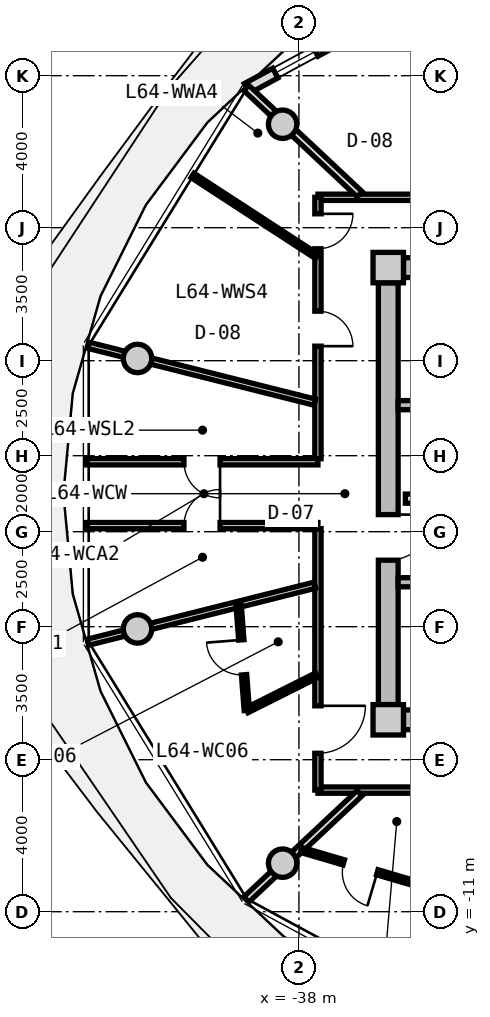
"""IFC4 building model, lengths in metres.
Left out: names, types, materials, properties, quantities, classifications, styles, units other than length and angle.
Written with IfcOpenShell. Run it as: python <this file> out.ifc"""

import sys

from ifc_helpers import new_model, si_unit, direction, frame, frame_2d, origin, origin_2d, place, context, subcontext, project, spatial, rectangle, circle, extrude, source, transform, mapped, element, fill, save


model = new_model("IFC4")
c1 = context("Model", 3, precision=1e-05, world=origin(), true_north=direction((0.0, 1.0)))
c2 = subcontext(c1, "Body", "Model", "MODEL_VIEW")
j1 = project(units=[si_unit("LENGTHUNIT", "METRE"), si_unit("PLANEANGLEUNIT", "RADIAN")], contexts=[c1])
p1 = place(None, origin())
s1 = spatial("IfcSite", under=j1, at=p1, CompositionType="ELEMENT")
p2 = place(p1, origin())
s2 = spatial("IfcBuilding", under=s1, at=p2, CompositionType="ELEMENT")
p3 = place(p2, frame((0.0, 0.0, 207.8)))
s3 = spatial("IfcBuildingStorey", under=s2, at=p3, CompositionType="ELEMENT", Elevation=207.8)
m1 = source(origin(), c2, "Body", "SweptSolid", [
    extrude(rectangle(XDim=0.8, YDim=0.8, at=origin_2d()), origin(), (0.0, 0.0, 1.0), 3.05),
])
for number, where, z_axis, x_axis in (
    (1, (-35.65, -5.95, 0.0), (0.0, 0.0, 1.0), (1.0, 0.0, 0.0)),
    (2, (-35.65, 5.95, 0.0), (0.0, 0.0, 1.0), (1.0, 0.0, 0.0)),
):
    element("IfcColumn", number, at=place(p3, frame(where, z_axis=z_axis, x_axis=x_axis)), inside=s3, PredefinedType="COLUMN", context=c2, shape_type="MappedRepresentation", body=[
        mapped(m1, transform((0.0, 0.0, 0.0), x_axis=(1.0, 0.0, 0.0), y_axis=(0.0, 1.0, 0.0), z_axis=(0.0, 0.0, 1.0), scale=1.0)),
    ])
m2 = source(origin(), c2, "Body", "SweptSolid", [
    extrude(rectangle(XDim=14.5, YDim=0.52, at=frame_2d((7.25, 0.0))), origin(), (0.0, 0.0, 1.0), 2.76),
])
for number, where, z_axis, x_axis in (
    (3, (-35.25, 5.95, 0.0), (0.0, 0.0, 1.0), (1.0, 0.0, 0.0)),
    (4, (-20.75, -5.95, 0.0), (0.0, 0.0, 1.0), (-1.0, 0.0, 0.0)),
):
    element("IfcWall", number, at=place(p3, frame(where, z_axis=z_axis, x_axis=x_axis)), inside=s3, PredefinedType="SHEAR", context=c2, shape_type="MappedRepresentation", body=[
        mapped(m2, transform((0.0, 0.0, 0.0), x_axis=(1.0, 0.0, 0.0), y_axis=(0.0, 1.0, 0.0), z_axis=(0.0, 0.0, 1.0), scale=1.0)),
    ])
m3 = source(origin(), c2, "Body", "SweptSolid", [
    extrude(rectangle(XDim=11.1, YDim=0.52, at=frame_2d((5.55, 0.0))), origin(), (0.0, 0.0, 1.0), 2.76),
])
p4 = place(p3, frame((-35.65, -5.55, 0.0), z_axis=(0.0, 0.0, 1.0), x_axis=(0.0, 1.0, 0.0)))
e5 = element("IfcWall", 5, at=p4, inside=s3, PredefinedType="SHEAR", context=c2, shape_type="MappedRepresentation", body=[
    mapped(m3, transform((0.0, 0.0, 0.0), x_axis=(1.0, 0.0, 0.0), y_axis=(0.0, 1.0, 0.0), z_axis=(0.0, 0.0, 1.0), scale=1.0)),
])
p5 = place(p4, frame((3.8, 0.0, 0.0)))
e6 = element("IfcOpeningElement", 6, at=p5, cuts=e5, PredefinedType="OPENING", context=c2, shape_type="SweptSolid", body=[
    extrude(rectangle(XDim=1.2, YDim=2.15, at=frame_2d((0.6, 1.075))), frame((0.0, 0.27, 0.0), z_axis=(0.0, -1.0, 0.0), x_axis=(1.0, 0.0, 0.0)), (0.0, 0.0, 1.0), 0.54),
])
m4 = source(origin(), c2, "Body", "SweptSolid", [
    extrude(circle(Radius=0.375, at=origin_2d()), origin(), (0.0, 0.0, 1.0), 3.05),
])
for number, where, z_axis, x_axis in (
    (7, (-38.43, 9.723, 0.0), (0.0, 0.0, 1.0), (1.0, 0.0, 0.0)),
    (8, (-42.247, 3.559, 0.0), (0.0, 0.0, 1.0), (1.0, 0.0, 0.0)),
    (9, (-42.247, -3.559, 0.0), (0.0, 0.0, 1.0), (1.0, 0.0, 0.0)),
    (10, (-38.43, -9.723, 0.0), (0.0, 0.0, 1.0), (1.0, 0.0, 0.0)),
):
    element("IfcColumn", number, at=place(p3, frame(where, z_axis=z_axis, x_axis=x_axis)), inside=s3, PredefinedType="COLUMN", context=c2, shape_type="MappedRepresentation", body=[
        mapped(m4, transform((0.0, 0.0, 0.0), x_axis=(1.0, 0.0, 0.0), y_axis=(0.0, 1.0, 0.0), z_axis=(0.0, 0.0, 1.0), scale=1.0)),
    ])
m5 = source(origin(), c2, "Body", "SweptSolid", [
    extrude(rectangle(XDim=8.197, YDim=0.29, at=frame_2d((4.099, 0.0))), origin(), (0.0, 0.0, 1.0), 2.76),
])
p6 = place(p3, frame((-39.37, 10.663, 0.0), z_axis=(0.0, 0.0, 1.0), x_axis=(0.879369910001, 0.476139224791, 0.0)))
e11 = element("IfcWall", 11, at=p6, inside=s3, PredefinedType="SOLIDWALL", context=c2, shape_type="MappedRepresentation", body=[
    mapped(m5, transform((0.0, 0.0, 0.0), x_axis=(1.0, 0.0, 0.0), y_axis=(0.0, 1.0, 0.0), z_axis=(0.0, 0.0, 1.0), scale=1.0)),
])
p7 = place(p6, frame((5.78, 0.0, 0.0)))
e12 = element("IfcOpeningElement", 12, at=p7, cuts=e11, PredefinedType="OPENING", context=c2, shape_type="SweptSolid", body=[
    extrude(rectangle(XDim=1.15, YDim=2.25, at=frame_2d((0.575, 1.125))), frame((0.0, 0.155, 0.0), z_axis=(0.0, -1.0, 0.0), x_axis=(1.0, 0.0, 0.0)), (0.0, 0.0, 1.0), 0.31),
])
p8 = place(p6, frame((0.85, 0.0, 0.85)))
e13 = element("IfcOpeningElement", 13, at=p8, cuts=e11, PredefinedType="OPENING", context=c2, shape_type="SweptSolid", body=[
    extrude(rectangle(XDim=1.2, YDim=1.5, at=frame_2d((0.6, 0.75))), frame((0.0, 0.155, 0.0), z_axis=(0.0, -1.0, 0.0), x_axis=(1.0, 0.0, 0.0)), (0.0, 0.0, 1.0), 0.31),
])
m6 = source(origin(), c2, "Body", "SweptSolid", [
    extrude(rectangle(XDim=7.93, YDim=0.24, at=frame_2d((3.965, 0.0))), origin(), (0.0, 0.0, 1.0), 2.76),
])
p9 = place(p3, frame((-35.39, 2.33, 0.0), z_axis=(0.0, 0.0, 1.0), x_axis=(1.0, 0.0, 0.0)))
e14 = element("IfcWall", 14, at=p9, inside=s3, PredefinedType="PARTITIONING", context=c2, shape_type="MappedRepresentation", body=[
    mapped(m6, transform((0.0, 0.0, 0.0), x_axis=(1.0, 0.0, 0.0), y_axis=(0.0, 1.0, 0.0), z_axis=(0.0, 0.0, 1.0), scale=1.0)),
])
p10 = place(p3, frame((-35.39, -2.33, 0.0), z_axis=(0.0, 0.0, 1.0), x_axis=(1.0, 0.0, 0.0)))
e15 = element("IfcWall", 15, at=p10, inside=s3, PredefinedType="PARTITIONING", context=c2, shape_type="MappedRepresentation", body=[
    mapped(m6, transform((0.0, 0.0, 0.0), x_axis=(1.0, 0.0, 0.0), y_axis=(0.0, 1.0, 0.0), z_axis=(0.0, 0.0, 1.0), scale=1.0)),
])
p11 = place(p10, frame((1.05, 0.0, 0.0)))
e16 = element("IfcOpeningElement", 16, at=p11, cuts=e15, PredefinedType="OPENING", context=c2, shape_type="SweptSolid", body=[
    extrude(rectangle(XDim=1.1, YDim=2.15, at=frame_2d((0.55, 1.075))), frame((0.0, 0.13, 0.0), z_axis=(0.0, -1.0, 0.0), x_axis=(1.0, 0.0, 0.0)), (0.0, 0.0, 1.0), 0.26),
])
m7 = source(origin(), c2, "Body", "SweptSolid", [
    extrude(rectangle(XDim=7.62, YDim=0.24, at=frame_2d((3.81, 0.0))), origin(), (0.0, 0.0, 1.0), 2.745),
])
p12 = place(p3, frame((-35.2, -0.13, 0.0), z_axis=(0.0, 0.0, 1.0), x_axis=(1.0, 0.0, 0.0)))
e17 = element("IfcWall", 17, at=p12, inside=s3, PredefinedType="PARTITIONING", context=c2, shape_type="MappedRepresentation", body=[
    mapped(m7, transform((0.0, 0.0, 0.0), x_axis=(1.0, 0.0, 0.0), y_axis=(0.0, 1.0, 0.0), z_axis=(0.0, 0.0, 1.0), scale=1.0)),
])
p13 = place(p12, frame((6.22, 0.0, 0.0)))
e18 = element("IfcOpeningElement", 18, at=p13, cuts=e17, PredefinedType="OPENING", context=c2, shape_type="SweptSolid", body=[
    extrude(rectangle(XDim=1.0, YDim=2.1, at=frame_2d((0.5, 1.05))), frame((0.0, 0.13, 0.0), z_axis=(0.0, -1.0, 0.0), x_axis=(1.0, 0.0, 0.0)), (0.0, 0.0, 1.0), 0.26),
])
p14 = place(p12, frame((2.4, 0.0, 0.0)))
e19 = element("IfcOpeningElement", 19, at=p14, cuts=e17, PredefinedType="OPENING", context=c2, shape_type="SweptSolid", body=[
    extrude(rectangle(XDim=1.0, YDim=2.1, at=frame_2d((0.5, 1.05))), frame((0.0, 0.13, 0.0), z_axis=(0.0, -1.0, 0.0), x_axis=(1.0, 0.0, 0.0)), (0.0, 0.0, 1.0), 0.26),
])
m8 = source(origin(), c2, "Body", "SweptSolid", [
    extrude(rectangle(XDim=8.58, YDim=0.165, at=frame_2d((4.29, 0.0))), origin(), (0.0, 0.0, 1.0), 2.745),
])
p15 = place(p3, frame((-37.5, 7.8, 0.0), z_axis=(0.0, 0.0, 1.0), x_axis=(1.0, 0.0, 0.0)))
e20 = element("IfcWall", 20, at=p15, inside=s3, PredefinedType="PARTITIONING", context=c2, shape_type="MappedRepresentation", body=[
    mapped(m8, transform((0.0, 0.0, 0.0), x_axis=(1.0, 0.0, 0.0), y_axis=(0.0, 1.0, 0.0), z_axis=(0.0, 0.0, 1.0), scale=1.0)),
])
p16 = place(p15, frame((3.528, 0.0, 0.0)))
e21 = element("IfcOpeningElement", 21, at=p16, cuts=e20, PredefinedType="OPENING", context=c2, shape_type="SweptSolid", body=[
    extrude(rectangle(XDim=1.25, YDim=2.2, at=frame_2d((0.625, 1.1))), frame((0.0, 0.093, 0.0), z_axis=(0.0, -1.0, 0.0), x_axis=(1.0, 0.0, 0.0)), (0.0, 0.0, 1.0), 0.185),
])
m9 = source(origin(), c2, "Body", "SweptSolid", [
    extrude(rectangle(XDim=19.0, YDim=0.165, at=frame_2d((9.5, 0.0))), origin(), (0.0, 0.0, 1.0), 2.745),
])
p17 = place(p3, frame((-18.5, -7.8, 0.0), z_axis=(0.0, 0.0, 1.0), x_axis=(-1.0, 0.0, 0.0)))
e22 = element("IfcWall", 22, at=p17, inside=s3, PredefinedType="PARTITIONING", context=c2, shape_type="MappedRepresentation", body=[
    mapped(m9, transform((0.0, 0.0, 0.0), x_axis=(1.0, 0.0, 0.0), y_axis=(0.0, 1.0, 0.0), z_axis=(0.0, 0.0, 1.0), scale=1.0)),
])
p18 = place(p17, frame((12.569, 0.0, 0.0)))
e23 = element("IfcOpeningElement", 23, at=p18, cuts=e22, PredefinedType="OPENING", context=c2, shape_type="SweptSolid", body=[
    extrude(rectangle(XDim=1.25, YDim=2.2, at=frame_2d((0.625, 1.1))), frame((0.0, 0.093, 0.0), z_axis=(0.0, -1.0, 0.0), x_axis=(1.0, 0.0, 0.0)), (0.0, 0.0, 1.0), 0.185),
])
p19 = place(p17, frame((8.875, 0.0, 0.0)))
e24 = element("IfcOpeningElement", 24, at=p19, cuts=e22, PredefinedType="OPENING", context=c2, shape_type="SweptSolid", body=[
    extrude(rectangle(XDim=1.25, YDim=2.2, at=frame_2d((0.625, 1.1))), frame((0.0, 0.093, 0.0), z_axis=(0.0, -1.0, 0.0), x_axis=(1.0, 0.0, 0.0)), (0.0, 0.0, 1.0), 0.185),
])
p20 = place(p17, frame((3.559, 0.0, 0.0)))
e25 = element("IfcOpeningElement", 25, at=p20, cuts=e22, PredefinedType="OPENING", context=c2, shape_type="SweptSolid", body=[
    extrude(rectangle(XDim=1.25, YDim=2.2, at=frame_2d((0.625, 1.1))), frame((0.0, 0.093, 0.0), z_axis=(0.0, -1.0, 0.0), x_axis=(1.0, 0.0, 0.0)), (0.0, 0.0, 1.0), 0.185),
])
m10 = source(origin(), c2, "Body", "SweptSolid", [
    extrude(rectangle(XDim=6.88, YDim=0.165, at=frame_2d((3.44, 0.0))), origin(), (0.0, 0.0, 1.0), 2.745),
])
p21 = place(p3, frame((-37.5, -7.8, 0.0), z_axis=(0.0, 0.0, 1.0), x_axis=(0.0, 1.0, 0.0)))
e26 = element("IfcWall", 26, at=p21, inside=s3, PredefinedType="PARTITIONING", context=c2, shape_type="MappedRepresentation", body=[
    mapped(m10, transform((0.0, 0.0, 0.0), x_axis=(1.0, 0.0, 0.0), y_axis=(0.0, 1.0, 0.0), z_axis=(0.0, 0.0, 1.0), scale=1.0)),
])
p22 = place(p21, frame((0.968, 0.0, 0.0)))
e27 = element("IfcOpeningElement", 27, at=p22, cuts=e26, PredefinedType="OPENING", context=c2, shape_type="SweptSolid", body=[
    extrude(rectangle(XDim=1.25, YDim=2.2, at=frame_2d((0.625, 1.1))), frame((0.0, 0.093, 0.0), z_axis=(0.0, -1.0, 0.0), x_axis=(1.0, 0.0, 0.0)), (0.0, 0.0, 1.0), 0.185),
])
p23 = place(p3, frame((-37.5, 0.92, 0.0), z_axis=(0.0, 0.0, 1.0), x_axis=(0.0, 1.0, 0.0)))
e28 = element("IfcWall", 28, at=p23, inside=s3, PredefinedType="PARTITIONING", context=c2, shape_type="MappedRepresentation", body=[
    mapped(m10, transform((0.0, 0.0, 0.0), x_axis=(1.0, 0.0, 0.0), y_axis=(0.0, 1.0, 0.0), z_axis=(0.0, 0.0, 1.0), scale=1.0)),
])
p24 = place(p23, frame((5.525, 0.0, 0.0)))
e29 = element("IfcOpeningElement", 29, at=p24, cuts=e28, PredefinedType="OPENING", context=c2, shape_type="SweptSolid", body=[
    extrude(rectangle(XDim=0.92, YDim=2.1, at=frame_2d((0.46, 1.05))), frame((0.0, 0.093, 0.0), z_axis=(0.0, -1.0, 0.0), x_axis=(1.0, 0.0, 0.0)), (0.0, 0.0, 1.0), 0.185),
])
p25 = place(p23, frame((2.962, 0.0, 0.0)))
e30 = element("IfcOpeningElement", 30, at=p25, cuts=e28, PredefinedType="OPENING", context=c2, shape_type="SweptSolid", body=[
    extrude(rectangle(XDim=0.92, YDim=2.1, at=frame_2d((0.46, 1.05))), frame((0.0, 0.093, 0.0), z_axis=(0.0, -1.0, 0.0), x_axis=(1.0, 0.0, 0.0)), (0.0, 0.0, 1.0), 0.185),
])
m11 = source(origin(), c2, "Body", "SweptSolid", [
    extrude(rectangle(XDim=6.157, YDim=0.165, at=frame_2d((3.079, 0.0))), origin(), (0.0, 0.0, 1.0), 2.385),
])
p26 = place(p3, frame((-37.58, 2.407, 0.0), z_axis=(0.0, 0.0, 1.0), x_axis=(-0.969840867184, 0.243738984038, 0.0)))
e31 = element("IfcWall", 31, at=p26, inside=s3, PredefinedType="PARTITIONING", context=c2, shape_type="MappedRepresentation", body=[
    mapped(m11, transform((0.0, 0.0, 0.0), x_axis=(1.0, 0.0, 0.0), y_axis=(0.0, 1.0, 0.0), z_axis=(0.0, 0.0, 1.0), scale=1.0)),
])
m12 = source(origin(), c2, "Body", "SweptSolid", [
    extrude(rectangle(XDim=6.157, YDim=0.165, at=frame_2d((3.079, 0.0))), origin(), (0.0, 0.0, 1.0), 2.345),
])
p27 = place(p3, frame((-37.58, -2.407, 0.0), z_axis=(0.0, 0.0, 1.0), x_axis=(-0.969840867184, -0.243738984038, 0.0)))
e32 = element("IfcWall", 32, at=p27, inside=s3, PredefinedType="PARTITIONING", context=c2, shape_type="MappedRepresentation", body=[
    mapped(m12, transform((0.0, 0.0, 0.0), x_axis=(1.0, 0.0, 0.0), y_axis=(0.0, 1.0, 0.0), z_axis=(0.0, 0.0, 1.0), scale=1.0)),
])
m13 = source(origin(), c2, "Body", "SweptSolid", [
    extrude(rectangle(XDim=6.101, YDim=0.165, at=frame_2d((3.051, 0.0))), origin(), (0.0, 0.0, 1.0), 2.745),
])
p28 = place(p3, frame((-43.601, 0.84, 0.0), z_axis=(0.0, 0.0, 1.0), x_axis=(1.0, 0.0, 0.0)))
e33 = element("IfcWall", 33, at=p28, inside=s3, PredefinedType="PARTITIONING", context=c2, shape_type="MappedRepresentation", body=[
    mapped(m13, transform((0.0, 0.0, 0.0), x_axis=(1.0, 0.0, 0.0), y_axis=(0.0, 1.0, 0.0), z_axis=(0.0, 0.0, 1.0), scale=1.0)),
])
p29 = place(p28, frame((2.576, 0.0, 0.0)))
e34 = element("IfcOpeningElement", 34, at=p29, cuts=e33, PredefinedType="OPENING", context=c2, shape_type="SweptSolid", body=[
    extrude(rectangle(XDim=0.95, YDim=2.1, at=frame_2d((0.475, 1.05))), frame((0.0, 0.093, 0.0), z_axis=(0.0, -1.0, 0.0), x_axis=(1.0, 0.0, 0.0)), (0.0, 0.0, 1.0), 0.185),
])
p30 = place(p3, frame((-37.5, -0.84, 0.0), z_axis=(0.0, 0.0, 1.0), x_axis=(-1.0, 0.0, 0.0)))
e35 = element("IfcWall", 35, at=p30, inside=s3, PredefinedType="PARTITIONING", context=c2, shape_type="MappedRepresentation", body=[
    mapped(m13, transform((0.0, 0.0, 0.0), x_axis=(1.0, 0.0, 0.0), y_axis=(0.0, 1.0, 0.0), z_axis=(0.0, 0.0, 1.0), scale=1.0)),
])
p31 = place(p30, frame((2.576, 0.0, 0.0)))
e36 = element("IfcOpeningElement", 36, at=p31, cuts=e35, PredefinedType="OPENING", context=c2, shape_type="SweptSolid", body=[
    extrude(rectangle(XDim=0.95, YDim=2.1, at=frame_2d((0.475, 1.05))), frame((0.0, 0.093, 0.0), z_axis=(0.0, -1.0, 0.0), x_axis=(1.0, 0.0, 0.0)), (0.0, 0.0, 1.0), 0.185),
])
m14 = source(origin(), c2, "Body", "SweptSolid", [
    extrude(rectangle(XDim=4.089, YDim=0.19, at=frame_2d((2.044, 0.0))), origin(), (0.0, 0.0, 1.0), 2.345),
])
p32 = place(p3, frame((-36.402, 7.88, 0.0), z_axis=(0.0, 0.0, 1.0), x_axis=(-0.729401273609, 0.684086092577, 0.0)))
e37 = element("IfcWall", 37, at=p32, inside=s3, PredefinedType="PARTITIONING", context=c2, shape_type="MappedRepresentation", body=[
    mapped(m14, transform((0.0, 0.0, 0.0), x_axis=(1.0, 0.0, 0.0), y_axis=(0.0, 1.0, 0.0), z_axis=(0.0, 0.0, 1.0), scale=1.0)),
])
m15 = source(origin(), c2, "Body", "SweptSolid", [
    extrude(rectangle(XDim=3.904, YDim=0.14, at=frame_2d((1.952, 0.0))), origin(), (0.0, 0.0, 1.0), 2.745),
])
p33 = place(p3, frame((-37.53, 6.246, 0.0), z_axis=(0.0, 0.0, 1.0), x_axis=(-0.838024687996, 0.545632314209, 0.0)))
e38 = element("IfcWall", 38, at=p33, inside=s3, PredefinedType="PARTITIONING", context=c2, shape_type="MappedRepresentation", body=[
    mapped(m15, transform((0.0, 0.0, 0.0), x_axis=(1.0, 0.0, 0.0), y_axis=(0.0, 1.0, 0.0), z_axis=(0.0, 0.0, 1.0), scale=1.0)),
])
p34 = place(p3, frame((-36.402, -7.88, 0.0), z_axis=(0.0, 0.0, 1.0), x_axis=(-0.729401273609, -0.684086092577, 0.0)))
e39 = element("IfcWall", 39, at=p34, inside=s3, PredefinedType="PARTITIONING", context=c2, shape_type="MappedRepresentation", body=[
    mapped(m14, transform((0.0, 0.0, 0.0), x_axis=(1.0, 0.0, 0.0), y_axis=(0.0, 1.0, 0.0), z_axis=(0.0, 0.0, 1.0), scale=1.0)),
])
m16 = source(origin(), c2, "Body", "SweptSolid", [
    extrude(rectangle(XDim=2.06, YDim=0.14, at=frame_2d((1.03, 0.0))), origin(), (0.0, 0.0, 1.0), 2.745),
])
p35 = place(p3, frame((-37.53, -4.778, 0.0), z_axis=(0.0, 0.0, 1.0), x_axis=(-0.893952568722, -0.448161583444, 0.0)))
e40 = element("IfcWall", 40, at=p35, inside=s3, PredefinedType="PARTITIONING", context=c2, shape_type="MappedRepresentation", body=[
    mapped(m16, transform((0.0, 0.0, 0.0), x_axis=(1.0, 0.0, 0.0), y_axis=(0.0, 1.0, 0.0), z_axis=(0.0, 0.0, 1.0), scale=1.0)),
])
m17 = source(origin(), c2, "Body", "SweptSolid", [
    extrude(rectangle(XDim=2.798, YDim=0.14, at=frame_2d((1.399, 0.0))), origin(), (0.0, 0.0, 1.0), 2.745),
])
p36 = place(p3, frame((-39.371, -5.701, 0.0), z_axis=(0.0, 0.0, 1.0), x_axis=(-0.077823984089, 0.996967114553, 0.0)))
e41 = element("IfcWall", 41, at=p36, inside=s3, PredefinedType="PARTITIONING", context=c2, shape_type="MappedRepresentation", body=[
    mapped(m17, transform((0.0, 0.0, 0.0), x_axis=(1.0, 0.0, 0.0), y_axis=(0.0, 1.0, 0.0), z_axis=(0.0, 0.0, 1.0), scale=1.0)),
])
p37 = place(p36, frame((0.939, 0.0, 0.0)))
e42 = element("IfcOpeningElement", 42, at=p37, cuts=e41, PredefinedType="OPENING", context=c2, shape_type="SweptSolid", body=[
    extrude(rectangle(XDim=0.92, YDim=2.1, at=frame_2d((0.46, 1.05))), frame((0.0, 0.08, 0.0), z_axis=(0.0, -1.0, 0.0), x_axis=(1.0, 0.0, 0.0)), (0.0, 0.0, 1.0), 0.16),
])
m18 = source(origin(), c2, "Body", "SweptSolid", [
    extrude(rectangle(XDim=3.252, YDim=0.14, at=frame_2d((1.626, 0.0))), origin(), (0.0, 0.0, 1.0), 2.745),
])
p38 = place(p3, frame((-34.82, -10.291, 0.0), z_axis=(0.0, 0.0, 1.0), x_axis=(-0.959294945864, 0.282406102695, 0.0)))
e43 = element("IfcWall", 43, at=p38, inside=s3, PredefinedType="PARTITIONING", context=c2, shape_type="MappedRepresentation", body=[
    mapped(m18, transform((0.0, 0.0, 0.0), x_axis=(1.0, 0.0, 0.0), y_axis=(0.0, 1.0, 0.0), z_axis=(0.0, 0.0, 1.0), scale=1.0)),
])
p39 = place(p38, frame((1.166, 0.0, 0.0)))
e44 = element("IfcOpeningElement", 44, at=p39, cuts=e43, PredefinedType="OPENING", context=c2, shape_type="SweptSolid", body=[
    extrude(rectangle(XDim=0.92, YDim=2.1, at=frame_2d((0.46, 1.05))), frame((0.0, 0.08, 0.0), z_axis=(0.0, -1.0, 0.0), x_axis=(1.0, 0.0, 0.0)), (0.0, 0.0, 1.0), 0.16),
])
m19 = source(origin(), c2, "Body", "SweptSolid", [
    extrude(rectangle(XDim=1.2, YDim=1.5, at=frame_2d((0.6, 0.75))), frame((0.0, 0.03, 0.0), z_axis=(0.0, -1.0, 0.0), x_axis=(1.0, 0.0, 0.0)), (0.0, 0.0, 1.0), 0.06),
])
p40 = place(p8, origin())
e45 = element("IfcWindow", 45, at=p40, inside=s3, PartitioningType="SINGLE_PANEL", PredefinedType="WINDOW", context=c2, shape_type="MappedRepresentation", body=[
    mapped(m19, transform((0.0, 0.0, 0.0), x_axis=(1.0, 0.0, 0.0), y_axis=(0.0, 1.0, 0.0), z_axis=(0.0, 0.0, 1.0), scale=1.0)),
])
fill(e13, e45)
m20 = source(origin(), c2, "Body", "SweptSolid", [
    extrude(rectangle(XDim=1.2, YDim=2.15, at=frame_2d((0.6, 1.075))), frame((0.0, 0.025, 0.0), z_axis=(0.0, -1.0, 0.0), x_axis=(1.0, 0.0, 0.0)), (0.0, 0.0, 1.0), 0.05),
])
p41 = place(p5, frame((1.2, 0.0, 0.0), z_axis=(0.0, 0.0, 1.0), x_axis=(-1.0, 0.0, 0.0)))
e46 = element("IfcDoor", 46, at=p41, inside=s3, OperationType="SINGLE_SWING_LEFT", PredefinedType="DOOR", context=c2, shape_type="MappedRepresentation", body=[
    mapped(m20, transform((0.0, 0.0, 0.0), x_axis=(1.0, 0.0, 0.0), y_axis=(0.0, 1.0, 0.0), z_axis=(0.0, 0.0, 1.0), scale=1.0)),
])
fill(e6, e46)
m21 = source(origin(), c2, "Body", "SweptSolid", [
    extrude(rectangle(XDim=0.95, YDim=2.1, at=frame_2d((0.475, 1.05))), frame((0.0, 0.025, 0.0), z_axis=(0.0, -1.0, 0.0), x_axis=(1.0, 0.0, 0.0)), (0.0, 0.0, 1.0), 0.05),
])
p42 = place(p31, frame((0.95, 0.0, 0.0), z_axis=(0.0, 0.0, 1.0), x_axis=(-1.0, 0.0, 0.0)))
e47 = element("IfcDoor", 47, at=p42, inside=s3, OperationType="SINGLE_SWING_RIGHT", PredefinedType="DOOR", context=c2, shape_type="MappedRepresentation", body=[
    mapped(m21, transform((0.0, 0.0, 0.0), x_axis=(1.0, 0.0, 0.0), y_axis=(0.0, 1.0, 0.0), z_axis=(0.0, 0.0, 1.0), scale=1.0)),
])
fill(e36, e47)
p43 = place(p29, frame((0.95, 0.0, 0.0), z_axis=(0.0, 0.0, 1.0), x_axis=(-1.0, 0.0, 0.0)))
e48 = element("IfcDoor", 48, at=p43, inside=s3, OperationType="SINGLE_SWING_LEFT", PredefinedType="DOOR", context=c2, shape_type="MappedRepresentation", body=[
    mapped(m21, transform((0.0, 0.0, 0.0), x_axis=(1.0, 0.0, 0.0), y_axis=(0.0, 1.0, 0.0), z_axis=(0.0, 0.0, 1.0), scale=1.0)),
])
fill(e34, e48)
m22 = source(origin(), c2, "Body", "SweptSolid", [
    extrude(rectangle(XDim=0.92, YDim=2.1, at=frame_2d((0.46, 1.05))), frame((0.0, 0.025, 0.0), z_axis=(0.0, -1.0, 0.0), x_axis=(1.0, 0.0, 0.0)), (0.0, 0.0, 1.0), 0.05),
])
p44 = place(p24, frame((0.92, 0.0, 0.0), z_axis=(0.0, 0.0, 1.0), x_axis=(-1.0, 0.0, 0.0)))
e49 = element("IfcDoor", 49, at=p44, inside=s3, OperationType="SINGLE_SWING_LEFT", PredefinedType="DOOR", context=c2, shape_type="MappedRepresentation", body=[
    mapped(m22, transform((0.0, 0.0, 0.0), x_axis=(1.0, 0.0, 0.0), y_axis=(0.0, 1.0, 0.0), z_axis=(0.0, 0.0, 1.0), scale=1.0)),
])
fill(e29, e49)
p45 = place(p25, frame((0.92, 0.0, 0.0), z_axis=(0.0, 0.0, 1.0), x_axis=(-1.0, 0.0, 0.0)))
e50 = element("IfcDoor", 50, at=p45, inside=s3, OperationType="SINGLE_SWING_RIGHT", PredefinedType="DOOR", context=c2, shape_type="MappedRepresentation", body=[
    mapped(m22, transform((0.0, 0.0, 0.0), x_axis=(1.0, 0.0, 0.0), y_axis=(0.0, 1.0, 0.0), z_axis=(0.0, 0.0, 1.0), scale=1.0)),
])
fill(e30, e50)
m23 = source(origin(), c2, "Body", "SweptSolid", [
    extrude(rectangle(XDim=1.25, YDim=2.2, at=frame_2d((0.625, 1.1))), frame((0.0, 0.025, 0.0), z_axis=(0.0, -1.0, 0.0), x_axis=(1.0, 0.0, 0.0)), (0.0, 0.0, 1.0), 0.05),
])
p46 = place(p22, frame((1.25, 0.0, 0.0), z_axis=(0.0, 0.0, 1.0), x_axis=(-1.0, 0.0, 0.0)))
e51 = element("IfcDoor", 51, at=p46, inside=s3, OperationType="SINGLE_SWING_LEFT", PredefinedType="DOOR", context=c2, shape_type="MappedRepresentation", body=[
    mapped(m23, transform((0.0, 0.0, 0.0), x_axis=(1.0, 0.0, 0.0), y_axis=(0.0, 1.0, 0.0), z_axis=(0.0, 0.0, 1.0), scale=1.0)),
])
fill(e27, e51)
p47 = place(p37, origin())
e52 = element("IfcDoor", 52, at=p47, inside=s3, OperationType="SINGLE_SWING_RIGHT", PredefinedType="DOOR", context=c2, shape_type="MappedRepresentation", body=[
    mapped(m22, transform((0.0, 0.0, 0.0), x_axis=(1.0, 0.0, 0.0), y_axis=(0.0, 1.0, 0.0), z_axis=(0.0, 0.0, 1.0), scale=1.0)),
])
fill(e42, e52)
p48 = place(p39, origin())
e53 = element("IfcDoor", 53, at=p48, inside=s3, OperationType="SINGLE_SWING_LEFT", PredefinedType="DOOR", context=c2, shape_type="MappedRepresentation", body=[
    mapped(m22, transform((0.0, 0.0, 0.0), x_axis=(1.0, 0.0, 0.0), y_axis=(0.0, 1.0, 0.0), z_axis=(0.0, 0.0, 1.0), scale=1.0)),
])
fill(e44, e53)
save(model, sys.argv[1])
